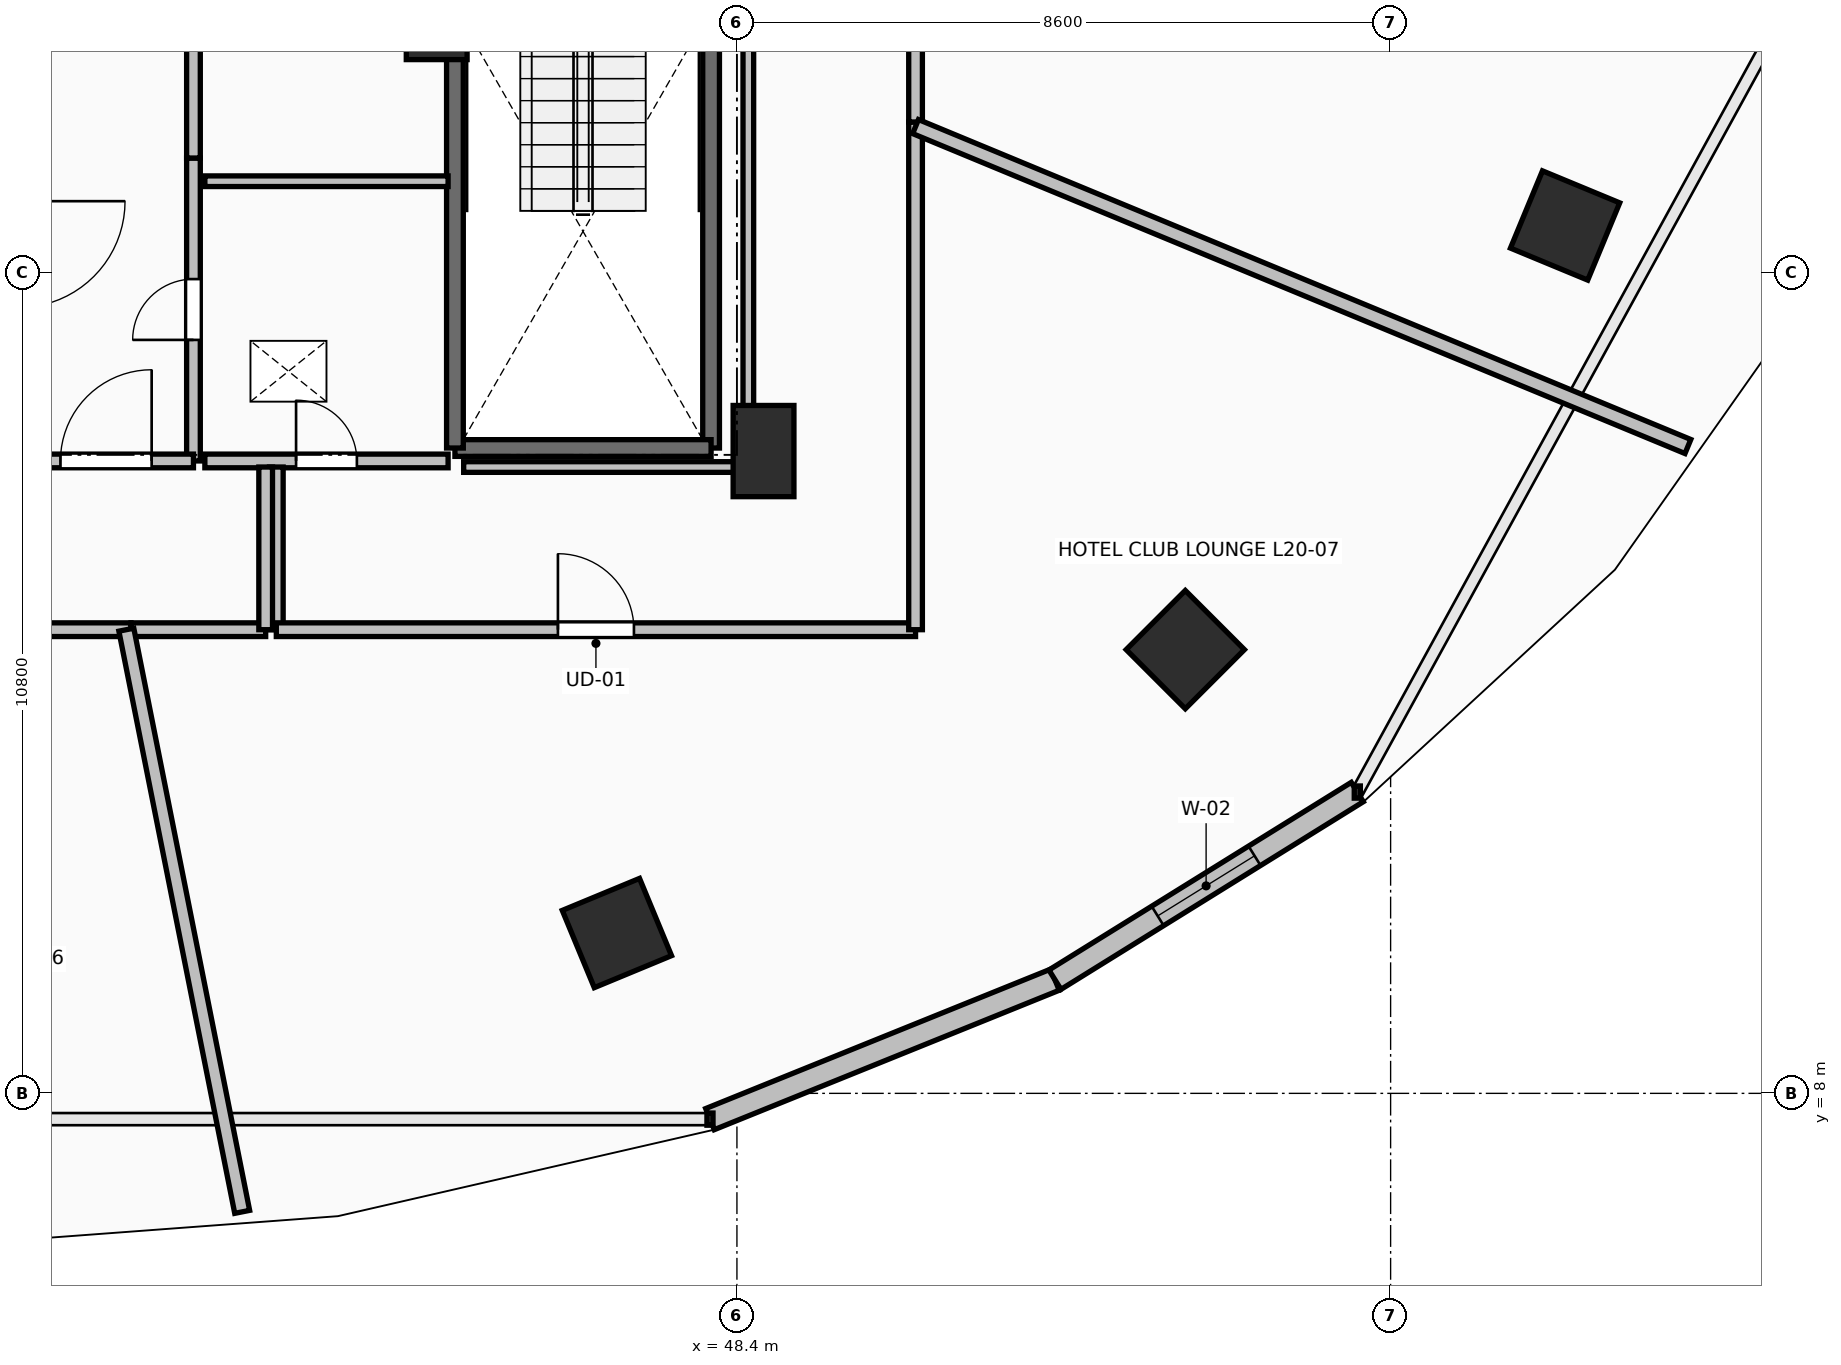
"""IFC4 building model, lengths in metres.
Left out: names, types, materials, properties, quantities, classifications, styles, units other than length and angle.
Written with IfcOpenShell. Run it as: python <this file> out.ifc"""

import sys

from ifc_helpers import new_model, si_unit, direction, frame, frame_2d, origin, origin_2d, place, context, subcontext, project, spatial, rectangle, extrude, element, fill, save


model = new_model("IFC4")
c1 = context("Model", 3, precision=1e-05, world=origin(), true_north=direction((0.0, 1.0)))
c2 = subcontext(c1, "Body", "Model", "MODEL_VIEW")
j1 = project(units=[si_unit("LENGTHUNIT", "METRE"), si_unit("PLANEANGLEUNIT", "RADIAN")], contexts=[c1])
p1 = place(None, origin())
s1 = spatial("IfcSite", under=j1, at=p1, CompositionType="ELEMENT")
p2 = place(p1, origin())
s2 = spatial("IfcBuilding", under=s1, at=p2, CompositionType="ELEMENT")
p3 = place(p2, frame((0.0, 0.0, 78.8)))
s3 = spatial("IfcBuildingStorey", under=s2, at=p3, CompositionType="ELEMENT", Elevation=78.8)
for number, where, z_axis, x_axis in (
    (1, (46.821, 10.109, 0.0), (0.0, 0.0, 1.0), (0.383, -0.924, 0.0)),
    (2, (54.299, 13.838, 0.0), (0.0, 0.0, 1.0), (0.707, -0.707, 0.0)),
    (3, (59.295, 19.418, 0.0), (0.0, 0.0, 1.0), (0.924, -0.383, 0.0)),
):
    element("IfcColumn", number, at=place(p3, frame(where, z_axis=z_axis, x_axis=x_axis)), inside=s3, PredefinedType="COLUMN", context=c2, shape_type="SweptSolid", body=[
        extrude(rectangle(XDim=1.1, YDim=1.1, at=origin_2d()), origin(), (0.0, 0.0, 1.0), 3.5),
    ])
for number, where, z_axis, x_axis in (
    (4, (48.75, 16.45, 0.0), (0.0, 0.0, 1.0), (1.0, 0.0, 0.0)),
    (5, (44.45, 22.2, 0.0), (0.0, 0.0, 1.0), (1.0, 0.0, 0.0)),
):
    element("IfcColumn", number, at=place(p3, frame(where, z_axis=z_axis, x_axis=x_axis)), inside=s3, PredefinedType="PILASTER", context=c2, shape_type="SweptSolid", body=[
        extrude(rectangle(XDim=0.8, YDim=1.2, at=origin_2d()), origin(), (0.0, 0.0, 1.0), 3.5),
    ])
p4 = place(p3, frame((48.045, 7.661, 0.0), z_axis=(0.0, 0.0, 1.0), x_axis=(0.927122233109, 0.374759075775, 0.0)))
e6 = element("IfcWall", 6, at=p4, inside=s3, PredefinedType="STANDARD", context=c2, shape_type="SweptSolid", body=[
    extrude(rectangle(XDim=4.895, YDim=0.3, at=frame_2d((2.448, 0.0))), origin(), (0.0, 0.0, 1.0), 3.24),
])
p5 = place(p3, frame((52.584, 9.495, 0.0), z_axis=(0.0, 0.0, 1.0), x_axis=(0.849684479743, 0.527291461038, 0.0)))
e7 = element("IfcWall", 7, at=p5, inside=s3, PredefinedType="STANDARD", context=c2, shape_type="SweptSolid", body=[
    extrude(rectangle(XDim=4.681, YDim=0.3, at=frame_2d((2.341, 0.0))), origin(), (0.0, 0.0, 1.0), 3.24),
])
p6 = place(p5, frame((1.591, 0.0, 0.85)))
e8 = element("IfcOpeningElement", 8, at=p6, cuts=e7, PredefinedType="OPENING", context=c2, shape_type="SweptSolid", body=[
    extrude(rectangle(XDim=1.5, YDim=2.19, at=frame_2d((0.75, 1.095))), frame((0.0, 0.165, 0.0), z_axis=(0.0, -1.0, 0.0), x_axis=(1.0, 0.0, 0.0)), (0.0, 0.0, 1.0), 0.33),
])
p7 = place(p3, frame((48.06, 23.91, 0.0), z_axis=(0.0, 0.0, 1.0), x_axis=(0.0, -1.0, 0.0)))
e9 = element("IfcWall", 9, at=p7, inside=s3, PredefinedType="SOLIDWALL", context=c2, shape_type="SweptSolid", body=[
    extrude(rectangle(XDim=7.42, YDim=0.22, at=frame_2d((3.71, 0.0))), origin(), (0.0, 0.0, 1.0), 3.24),
])
p8 = place(p3, frame((48.06, 16.49, 0.0), z_axis=(0.0, 0.0, 1.0), x_axis=(-1.0, 0.0, 0.0)))
e10 = element("IfcWall", 10, at=p8, inside=s3, PredefinedType="SOLIDWALL", context=c2, shape_type="SweptSolid", body=[
    extrude(rectangle(XDim=3.37, YDim=0.22, at=frame_2d((1.685, 0.0))), origin(), (0.0, 0.0, 1.0), 3.24),
])
p9 = place(p3, frame((44.69, 16.49, 0.0), z_axis=(0.0, 0.0, 1.0), x_axis=(0.0, 1.0, 0.0)))
e11 = element("IfcWall", 11, at=p9, inside=s3, PredefinedType="SOLIDWALL", context=c2, shape_type="SweptSolid", body=[
    extrude(rectangle(XDim=7.42, YDim=0.22, at=frame_2d((3.71, 0.0))), origin(), (0.0, 0.0, 1.0), 3.24),
])
p10 = place(p3, frame((41.25, 16.32, 0.0), z_axis=(0.0, 0.0, 1.0), x_axis=(0.0, 1.0, 0.0)))
e12 = element("IfcWall", 12, at=p10, inside=s3, PredefinedType="PARTITIONING", context=c2, shape_type="SweptSolid", body=[
    extrude(rectangle(XDim=3.985, YDim=0.18, at=frame_2d((1.992, 0.0))), origin(), (0.0, 0.0, 1.0), 3.24),
])
p11 = place(p10, frame((1.593, 0.0, 0.0)))
e13 = element("IfcOpeningElement", 13, at=p11, cuts=e12, PredefinedType="OPENING", context=c2, shape_type="SweptSolid", body=[
    extrude(rectangle(XDim=0.8, YDim=2.05, at=frame_2d((0.4, 1.025))), frame((0.0, 0.105, 0.0), z_axis=(0.0, -1.0, 0.0), x_axis=(1.0, 0.0, 0.0)), (0.0, 0.0, 1.0), 0.21),
])
p12 = place(p3, frame((41.25, 20.305, 0.0), z_axis=(0.0, 0.0, 1.0), x_axis=(0.0, 1.0, 0.0)))
e14 = element("IfcWall", 14, at=p12, inside=s3, PredefinedType="PARTITIONING", context=c2, shape_type="SweptSolid", body=[
    extrude(rectangle(XDim=3.895, YDim=0.18, at=frame_2d((1.948, 0.0))), origin(), (0.0, 0.0, 1.0), 3.24),
])
p13 = place(p12, frame((1.522, 0.0, 0.0)))
e15 = element("IfcOpeningElement", 15, at=p13, cuts=e14, PredefinedType="OPENING", context=c2, shape_type="SweptSolid", body=[
    extrude(rectangle(XDim=0.85, YDim=2.1, at=frame_2d((0.425, 1.05))), frame((0.0, 0.105, 0.0), z_axis=(0.0, -1.0, 0.0), x_axis=(1.0, 0.0, 0.0)), (0.0, 0.0, 1.0), 0.21),
])
p14 = place(p3, frame((38.95, 16.32, 0.0), z_axis=(0.0, 0.0, 1.0), x_axis=(1.0, 0.0, 0.0)))
e16 = element("IfcWall", 16, at=p14, inside=s3, PredefinedType="PARTITIONING", context=c2, shape_type="SweptSolid", body=[
    extrude(rectangle(XDim=2.3, YDim=0.18, at=frame_2d((1.15, 0.0))), origin(), (0.0, 0.0, 1.0), 3.24),
])
p15 = place(p14, frame((0.55, 0.0, 0.0)))
e17 = element("IfcOpeningElement", 17, at=p15, cuts=e16, PredefinedType="OPENING", context=c2, shape_type="SweptSolid", body=[
    extrude(rectangle(XDim=1.2, YDim=2.15, at=frame_2d((0.6, 1.075))), frame((0.0, 0.105, 0.0), z_axis=(0.0, -1.0, 0.0), x_axis=(1.0, 0.0, 0.0)), (0.0, 0.0, 1.0), 0.21),
])
p16 = place(p3, frame((44.6, 20.0, 0.0), z_axis=(0.0, 0.0, 1.0), x_axis=(-1.0, 0.0, 0.0)))
e18 = element("IfcWall", 18, at=p16, inside=s3, PredefinedType="PARTITIONING", context=c2, shape_type="SweptSolid", body=[
    extrude(rectangle(XDim=3.2, YDim=0.14, at=frame_2d((1.6, 0.0))), origin(), (0.0, 0.0, 1.0), 3.24),
])
p17 = place(p3, frame((41.4, 16.32, 0.0), z_axis=(0.0, 0.0, 1.0), x_axis=(1.0, 0.0, 0.0)))
e19 = element("IfcWall", 19, at=p17, inside=s3, PredefinedType="PARTITIONING", context=c2, shape_type="SweptSolid", body=[
    extrude(rectangle(XDim=3.2, YDim=0.18, at=frame_2d((1.6, 0.0))), origin(), (0.0, 0.0, 1.0), 3.24),
])
p18 = place(p17, frame((1.2, 0.0, 0.0)))
e20 = element("IfcOpeningElement", 20, at=p18, cuts=e19, PredefinedType="OPENING", context=c2, shape_type="SweptSolid", body=[
    extrude(rectangle(XDim=0.8, YDim=2.05, at=frame_2d((0.4, 1.025))), frame((0.0, 0.105, 0.0), z_axis=(0.0, -1.0, 0.0), x_axis=(1.0, 0.0, 0.0)), (0.0, 0.0, 1.0), 0.21),
])
p19 = place(p3, frame((36.341, 14.1, 0.0), z_axis=(0.0, 0.0, 1.0), x_axis=(1.0, 0.0, 0.0)))
e21 = element("IfcWall", 21, at=p19, inside=s3, PredefinedType="PARTITIONING", context=c2, shape_type="SweptSolid", body=[
    extrude(rectangle(XDim=4.087, YDim=0.18, at=frame_2d((2.043, 0.0))), origin(), (0.0, 0.0, 1.0), 2.922),
])
p20 = place(p19, frame((1.519, 0.0, 0.0)))
e22 = element("IfcOpeningElement", 22, at=p20, cuts=e21, PredefinedType="OPENING", context=c2, shape_type="SweptSolid", body=[
    extrude(rectangle(XDim=1.05, YDim=2.2, at=frame_2d((0.525, 1.1))), frame((0.0, 0.105, 0.0), z_axis=(0.0, -1.0, 0.0), x_axis=(1.0, 0.0, 0.0)), (0.0, 0.0, 1.0), 0.21),
])
p21 = place(p3, frame((42.34, 16.24, 0.0), z_axis=(0.0, 0.0, 1.0), x_axis=(0.0, -1.0, 0.0)))
e23 = element("IfcWall", 23, at=p21, inside=s3, PredefinedType="PARTITIONING", context=c2, shape_type="SweptSolid", body=[
    extrude(rectangle(XDim=2.14, YDim=0.18, at=frame_2d((1.07, 0.0))), origin(), (0.0, 0.0, 1.0), 2.922),
])
p22 = place(p3, frame((42.34, 14.1, 0.0), z_axis=(0.0, 0.0, 1.0), x_axis=(1.0, 0.0, 0.0)))
e24 = element("IfcWall", 24, at=p22, inside=s3, PredefinedType="PARTITIONING", context=c2, shape_type="SweptSolid", body=[
    extrude(rectangle(XDim=8.41, YDim=0.18, at=frame_2d((4.205, 0.0))), origin(), (0.0, 0.0, 1.0), 2.432),
])
p23 = place(p22, frame((3.705, 0.0, 0.0)))
e25 = element("IfcOpeningElement", 25, at=p23, cuts=e24, PredefinedType="OPENING", context=c2, shape_type="SweptSolid", body=[
    extrude(rectangle(XDim=1.0, YDim=2.15, at=frame_2d((0.5, 1.075))), frame((0.0, 0.105, 0.0), z_axis=(0.0, -1.0, 0.0), x_axis=(1.0, 0.0, 0.0)), (0.0, 0.0, 1.0), 0.21),
])
p24 = place(p3, frame((50.75, 14.1, 0.0), z_axis=(0.0, 0.0, 1.0), x_axis=(0.0, 1.0, 0.0)))
e26 = element("IfcWall", 26, at=p24, inside=s3, PredefinedType="PARTITIONING", context=c2, shape_type="SweptSolid", body=[
    extrude(rectangle(XDim=6.679, YDim=0.18, at=frame_2d((3.339, 0.0))), origin(), (0.0, 0.0, 1.0), 2.432),
])
p25 = place(p3, frame((40.428, 14.1, 0.0), z_axis=(0.0, 0.0, 1.0), x_axis=(1.0, 0.0, 0.0)))
e27 = element("IfcWall", 27, at=p25, inside=s3, PredefinedType="PARTITIONING", context=c2, shape_type="SweptSolid", body=[
    extrude(rectangle(XDim=1.772, YDim=0.18, at=frame_2d((0.886, 0.0))), origin(), (0.0, 0.0, 1.0), 2.922),
])
p26 = place(p3, frame((42.2, 14.1, 0.0), z_axis=(0.0, 0.0, 1.0), x_axis=(0.0, 1.0, 0.0)))
e28 = element("IfcWall", 28, at=p26, inside=s3, PredefinedType="PARTITIONING", context=c2, shape_type="SweptSolid", body=[
    extrude(rectangle(XDim=2.14, YDim=0.18, at=frame_2d((1.07, 0.0))), origin(), (0.0, 0.0, 1.0), 2.922),
])
p27 = place(p3, frame((50.75, 20.779, 0.0), z_axis=(0.0, 0.0, 1.0), x_axis=(0.0, 1.0, 0.0)))
e29 = element("IfcWall", 29, at=p27, inside=s3, PredefinedType="PARTITIONING", context=c2, shape_type="SweptSolid", body=[
    extrude(rectangle(XDim=13.54, YDim=0.18, at=frame_2d((6.77, 0.0))), origin(), (0.0, 0.0, 1.0), 2.432),
])
p28 = place(p27, frame((6.27, 0.0, 0.0)))
e30 = element("IfcOpeningElement", 30, at=p28, cuts=e29, PredefinedType="OPENING", context=c2, shape_type="SweptSolid", body=[
    extrude(rectangle(XDim=1.0, YDim=2.15, at=frame_2d((0.5, 1.075))), frame((0.0, 0.105, 0.0), z_axis=(0.0, -1.0, 0.0), x_axis=(1.0, 0.0, 0.0)), (0.0, 0.0, 1.0), 0.21),
])
p29 = place(p3, frame((41.891, 6.441, 0.0), z_axis=(0.0, 0.0, 1.0), x_axis=(-0.195172155482, 0.980768999166, 0.0)))
e31 = element("IfcWall", 31, at=p29, inside=s3, PredefinedType="PARTITIONING", context=c2, shape_type="SweptSolid", body=[
    extrude(rectangle(XDim=7.809, YDim=0.2, at=frame_2d((3.905, 0.0))), origin(), (0.0, 0.0, 1.0), 2.432),
])
p30 = place(p3, frame((60.911, 16.51, 0.0), z_axis=(0.0, 0.0, 1.0), x_axis=(-0.923872894692, 0.382699457086, 0.0)))
e32 = element("IfcWall", 32, at=p30, inside=s3, PredefinedType="PARTITIONING", context=c2, shape_type="SweptSolid", body=[
    extrude(rectangle(XDim=10.998, YDim=0.2, at=frame_2d((5.499, 0.0))), origin(), (0.0, 0.0, 1.0), 2.677),
])
p31 = place(p3, frame((48.55, 23.754, 0.0), z_axis=(0.0, 0.0, 1.0), x_axis=(0.0, -1.0, 0.0)))
e33 = element("IfcWall", 33, at=p31, inside=s3, PredefinedType="PARTITIONING", context=c2, shape_type="SweptSolid", body=[
    extrude(rectangle(XDim=7.514, YDim=0.14, at=frame_2d((3.757, 0.0))), origin(), (0.0, 0.0, 1.0), 2.432),
])
p32 = place(p3, frame((48.55, 16.24, 0.0), z_axis=(0.0, 0.0, 1.0), x_axis=(-1.0, 0.0, 0.0)))
e34 = element("IfcWall", 34, at=p32, inside=s3, PredefinedType="PARTITIONING", context=c2, shape_type="SweptSolid", body=[
    extrude(rectangle(XDim=3.745, YDim=0.14, at=frame_2d((1.873, 0.0))), origin(), (0.0, 0.0, 1.0), 2.432),
])
p33 = place(p6, origin())
e35 = element("IfcWindow", 35, at=p33, inside=s3, PartitioningType="SINGLE_PANEL", PredefinedType="WINDOW", context=c2, shape_type="SweptSolid", body=[
    extrude(rectangle(XDim=1.5, YDim=2.19, at=frame_2d((0.75, 1.095))), frame((0.0, 0.03, 0.0), z_axis=(0.0, -1.0, 0.0), x_axis=(1.0, 0.0, 0.0)), (0.0, 0.0, 1.0), 0.06),
])
fill(e8, e35)
p34 = place(p11, origin())
e36 = element("IfcDoor", 36, at=p34, inside=s3, OperationType="SINGLE_SWING_LEFT", PredefinedType="DOOR", context=c2, shape_type="SweptSolid", body=[
    extrude(rectangle(XDim=0.8, YDim=2.05, at=frame_2d((0.4, 1.025))), frame((0.0, 0.025, 0.0), z_axis=(0.0, -1.0, 0.0), x_axis=(1.0, 0.0, 0.0)), (0.0, 0.0, 1.0), 0.05),
])
fill(e13, e36)
p35 = place(p15, origin())
e37 = element("IfcDoor", 37, at=p35, inside=s3, OperationType="SINGLE_SWING_RIGHT", PredefinedType="DOOR", context=c2, shape_type="SweptSolid", body=[
    extrude(rectangle(XDim=1.2, YDim=2.15, at=frame_2d((0.6, 1.075))), frame((0.0, 0.025, 0.0), z_axis=(0.0, -1.0, 0.0), x_axis=(1.0, 0.0, 0.0)), (0.0, 0.0, 1.0), 0.05),
])
fill(e17, e37)
p36 = place(p18, origin())
e38 = element("IfcDoor", 38, at=p36, inside=s3, OperationType="SINGLE_SWING_LEFT", PredefinedType="DOOR", context=c2, shape_type="SweptSolid", body=[
    extrude(rectangle(XDim=0.8, YDim=2.05, at=frame_2d((0.4, 1.025))), frame((0.0, 0.025, 0.0), z_axis=(0.0, -1.0, 0.0), x_axis=(1.0, 0.0, 0.0)), (0.0, 0.0, 1.0), 0.05),
])
fill(e20, e38)
p37 = place(p23, origin())
e39 = element("IfcDoor", 39, at=p37, inside=s3, OperationType="SINGLE_SWING_LEFT", PredefinedType="DOOR", context=c2, shape_type="SweptSolid", body=[
    extrude(rectangle(XDim=1.0, YDim=2.15, at=frame_2d((0.5, 1.075))), frame((0.0, 0.025, 0.0), z_axis=(0.0, -1.0, 0.0), x_axis=(1.0, 0.0, 0.0)), (0.0, 0.0, 1.0), 0.05),
])
fill(e25, e39)
save(model, sys.argv[1])
